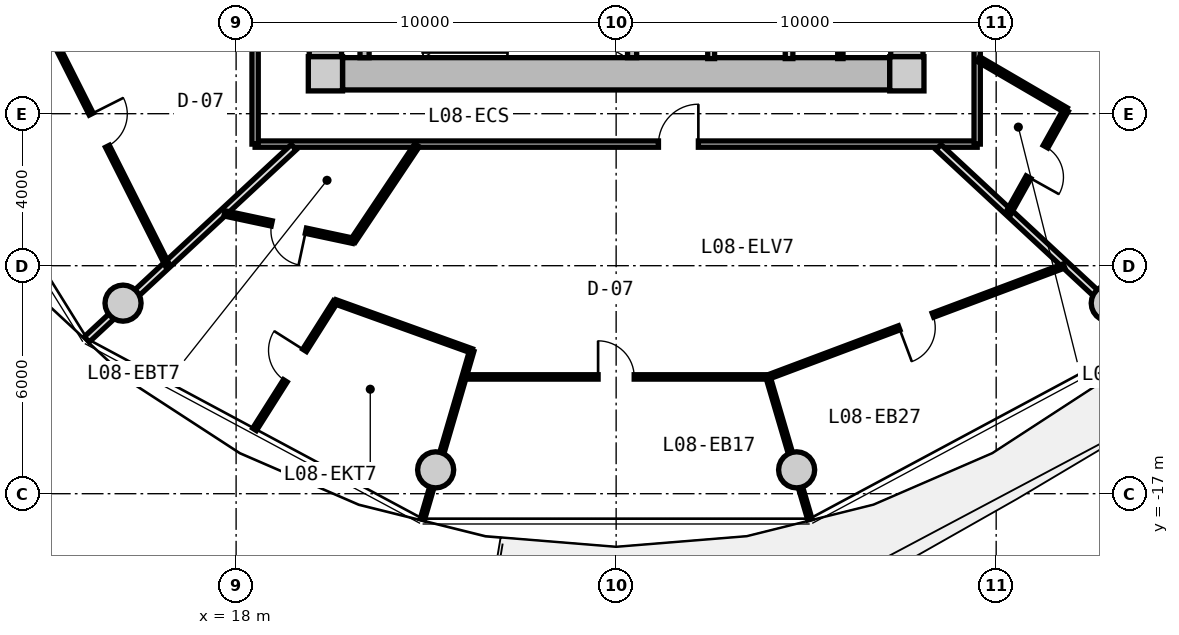
"""IFC4 building model, lengths in metres.
Left out: names, types, materials, properties, quantities, classifications, styles, units other than length and angle.
Written with IfcOpenShell. Run it as: python <this file> out.ifc"""

import sys

from ifc_helpers import new_model, si_unit, direction, frame, frame_2d, origin, origin_2d, place, context, subcontext, project, spatial, rectangle, circle, extrude, source, transform, mapped, element, fill, save


model = new_model("IFC4")
c1 = context("Model", 3, precision=1e-05, world=origin(), true_north=direction((0.0, 1.0)))
c2 = subcontext(c1, "Body", "Model", "MODEL_VIEW")
j1 = project(units=[si_unit("LENGTHUNIT", "METRE"), si_unit("PLANEANGLEUNIT", "RADIAN")], contexts=[c1])
p1 = place(None, origin())
s1 = spatial("IfcSite", under=j1, at=p1, CompositionType="ELEMENT")
p2 = place(p1, origin())
s2 = spatial("IfcBuilding", under=s1, at=p2, CompositionType="ELEMENT")
p3 = place(p2, frame((0.0, 0.0, 30.75)))
s3 = spatial("IfcBuildingStorey", under=s2, at=p3, CompositionType="ELEMENT", Elevation=30.75)
m1 = source(origin(), c2, "Body", "SweptSolid", [
    extrude(rectangle(XDim=0.9, YDim=0.9, at=origin_2d()), origin(), (0.0, 0.0, 1.0), 3.05),
])
for number, where, z_axis, x_axis in (
    (1, (20.35, -5.95, 0.0), (0.0, 0.0, 1.0), (1.0, 0.0, 0.0)),
    (2, (35.65, -5.95, 0.0), (0.0, 0.0, 1.0), (1.0, 0.0, 0.0)),
):
    element("IfcColumn", number, at=place(p3, frame(where, z_axis=z_axis, x_axis=x_axis)), inside=s3, PredefinedType="COLUMN", context=c2, shape_type="MappedRepresentation", body=[
        mapped(m1, transform((0.0, 0.0, 0.0), x_axis=(1.0, 0.0, 0.0), y_axis=(0.0, 1.0, 0.0), z_axis=(0.0, 0.0, 1.0), scale=1.0)),
    ])
m2 = source(origin(), c2, "Body", "SweptSolid", [
    extrude(rectangle(XDim=14.4, YDim=0.85, at=frame_2d((7.2, 0.0))), origin(), (0.0, 0.0, 1.0), 2.79),
])
p4 = place(p3, frame((35.2, -5.95, 0.0), z_axis=(0.0, 0.0, 1.0), x_axis=(-1.0, 0.0, 0.0)))
e3 = element("IfcWall", 3, at=p4, inside=s3, PredefinedType="SHEAR", context=c2, shape_type="MappedRepresentation", body=[
    mapped(m2, transform((0.0, 0.0, 0.0), x_axis=(1.0, 0.0, 0.0), y_axis=(0.0, 1.0, 0.0), z_axis=(0.0, 0.0, 1.0), scale=1.0)),
])
m3 = source(origin(), c2, "Body", "SweptSolid", [
    extrude(rectangle(XDim=11.0, YDim=0.85, at=frame_2d((5.5, 0.0))), origin(), (0.0, 0.0, 1.0), 2.79),
])
p5 = place(p3, frame((20.35, -5.5, 0.0), z_axis=(0.0, 0.0, 1.0), x_axis=(0.0, 1.0, 0.0)))
e4 = element("IfcWall", 4, at=p5, inside=s3, PredefinedType="SHEAR", context=c2, shape_type="MappedRepresentation", body=[
    mapped(m3, transform((0.0, 0.0, 0.0), x_axis=(1.0, 0.0, 0.0), y_axis=(0.0, 1.0, 0.0), z_axis=(0.0, 0.0, 1.0), scale=1.0)),
])
p6 = place(p5, frame((3.8, 0.0, 0.0)))
e5 = element("IfcOpeningElement", 5, at=p6, cuts=e4, PredefinedType="OPENING", context=c2, shape_type="SweptSolid", body=[
    extrude(rectangle(XDim=1.2, YDim=2.15, at=frame_2d((0.6, 1.075))), frame((0.0, 0.435, 0.0), z_axis=(0.0, -1.0, 0.0), x_axis=(1.0, 0.0, 0.0)), (0.0, 0.0, 1.0), 0.87),
])
p7 = place(p3, frame((35.65, 5.5, 0.0), z_axis=(0.0, 0.0, 1.0), x_axis=(0.0, -1.0, 0.0)))
e6 = element("IfcWall", 6, at=p7, inside=s3, PredefinedType="SHEAR", context=c2, shape_type="MappedRepresentation", body=[
    mapped(m3, transform((0.0, 0.0, 0.0), x_axis=(1.0, 0.0, 0.0), y_axis=(0.0, 1.0, 0.0), z_axis=(0.0, 0.0, 1.0), scale=1.0)),
])
p8 = place(p7, frame((5.65, 0.0, 0.0)))
e7 = element("IfcOpeningElement", 7, at=p8, cuts=e6, PredefinedType="OPENING", context=c2, shape_type="SweptSolid", body=[
    extrude(rectangle(XDim=1.2, YDim=2.15, at=frame_2d((0.6, 1.075))), frame((0.0, 0.435, 0.0), z_axis=(0.0, -1.0, 0.0), x_axis=(1.0, 0.0, 0.0)), (0.0, 0.0, 1.0), 0.87),
])
m4 = source(origin(), c2, "Body", "SweptSolid", [
    extrude(circle(Radius=0.475, at=origin_2d()), origin(), (0.0, 0.0, 1.0), 3.05),
])
for number, where, z_axis, x_axis in (
    (8, (15.025, -11.985, 0.0), (0.0, 0.0, 1.0), (1.0, 0.0, 0.0)),
    (9, (23.251, -16.373, 0.0), (0.0, 0.0, 1.0), (1.0, 0.0, 0.0)),
    (10, (32.749, -16.373, 0.0), (0.0, 0.0, 1.0), (1.0, 0.0, 0.0)),
    (11, (40.975, -11.985, 0.0), (0.0, 0.0, 1.0), (1.0, 0.0, 0.0)),
):
    element("IfcColumn", number, at=place(p3, frame(where, z_axis=z_axis, x_axis=x_axis)), inside=s3, PredefinedType="COLUMN", context=c2, shape_type="MappedRepresentation", body=[
        mapped(m4, transform((0.0, 0.0, 0.0), x_axis=(1.0, 0.0, 0.0), y_axis=(0.0, 1.0, 0.0), z_axis=(0.0, 0.0, 1.0), scale=1.0)),
    ])
m5 = source(origin(), c2, "Body", "SweptSolid", [
    extrude(rectangle(XDim=3.075, YDim=0.24, at=frame_2d((1.538, 0.0))), origin(), (0.0, 0.0, 1.0), 2.79),
])
for number, where, z_axis, x_axis in (
    (12, (21.38, -5.525, 0.0), (0.0, 0.0, 1.0), (0.0, 1.0, 0.0)),
    (13, (28.42, -5.525, 0.0), (0.0, 0.0, 1.0), (0.0, 1.0, 0.0)),
):
    element("IfcWall", number, at=place(p3, frame(where, z_axis=z_axis, x_axis=x_axis)), inside=s3, PredefinedType="PARTITIONING", context=c2, shape_type="MappedRepresentation", body=[
        mapped(m5, transform((0.0, 0.0, 0.0), x_axis=(1.0, 0.0, 0.0), y_axis=(0.0, 1.0, 0.0), z_axis=(0.0, 0.0, 1.0), scale=1.0)),
    ])
m6 = source(origin(), c2, "Body", "SweptSolid", [
    extrude(rectangle(XDim=3.8, YDim=0.2, at=frame_2d((1.9, 0.0))), origin(), (0.0, 0.0, 1.0), 2.775),
])
p9 = place(p3, frame((32.55, -5.55, 0.0), z_axis=(0.0, 0.0, 1.0), x_axis=(0.0, 1.0, 0.0)))
e14 = element("IfcWall", 14, at=p9, inside=s3, PredefinedType="PARTITIONING", context=c2, shape_type="MappedRepresentation", body=[
    mapped(m6, transform((0.0, 0.0, 0.0), x_axis=(1.0, 0.0, 0.0), y_axis=(0.0, 1.0, 0.0), z_axis=(0.0, 0.0, 1.0), scale=1.0)),
])
m7 = source(origin(), c2, "Body", "SweptSolid", [
    extrude(rectangle(XDim=3.22, YDim=0.18, at=frame_2d((1.61, 0.0))), origin(), (0.0, 0.0, 1.0), 2.775),
])
p10 = place(p3, frame((30.5, -5.55, 0.0), z_axis=(0.0, 0.0, 1.0), x_axis=(0.0, 1.0, 0.0)))
e15 = element("IfcWall", 15, at=p10, inside=s3, PredefinedType="PARTITIONING", context=c2, shape_type="MappedRepresentation", body=[
    mapped(m7, transform((0.0, 0.0, 0.0), x_axis=(1.0, 0.0, 0.0), y_axis=(0.0, 1.0, 0.0), z_axis=(0.0, 0.0, 1.0), scale=1.0)),
])
m8 = source(origin(), c2, "Body", "SweptSolid", [
    extrude(rectangle(XDim=3.8, YDim=0.14, at=frame_2d((1.9, 0.0))), origin(), (0.0, 0.0, 1.0), 2.775),
])
p11 = place(p3, frame((33.9, -5.55, 0.0), z_axis=(0.0, 0.0, 1.0), x_axis=(0.0, 1.0, 0.0)))
e16 = element("IfcWall", 16, at=p11, inside=s3, PredefinedType="PARTITIONING", context=c2, shape_type="MappedRepresentation", body=[
    mapped(m8, transform((0.0, 0.0, 0.0), x_axis=(1.0, 0.0, 0.0), y_axis=(0.0, 1.0, 0.0), z_axis=(0.0, 0.0, 1.0), scale=1.0)),
])
m9 = source(origin(), c2, "Body", "SweptSolid", [
    extrude(rectangle(XDim=19.0, YDim=0.165, at=frame_2d((9.5, 0.0))), origin(), (0.0, 0.0, 1.0), 2.775),
])
p12 = place(p3, frame((37.5, -7.8, 0.0), z_axis=(0.0, 0.0, 1.0), x_axis=(-1.0, 0.0, 0.0)))
e17 = element("IfcWall", 17, at=p12, inside=s3, PredefinedType="PARTITIONING", context=c2, shape_type="MappedRepresentation", body=[
    mapped(m9, transform((0.0, 0.0, 0.0), x_axis=(1.0, 0.0, 0.0), y_axis=(0.0, 1.0, 0.0), z_axis=(0.0, 0.0, 1.0), scale=1.0)),
])
p13 = place(p12, frame((7.336, 0.0, 0.0)))
e18 = element("IfcOpeningElement", 18, at=p13, cuts=e17, PredefinedType="OPENING", context=c2, shape_type="SweptSolid", body=[
    extrude(rectangle(XDim=1.05, YDim=2.15, at=frame_2d((0.525, 1.075))), frame((0.0, 0.093, 0.0), z_axis=(0.0, -1.0, 0.0), x_axis=(1.0, 0.0, 0.0)), (0.0, 0.0, 1.0), 0.185),
])
m10 = source(origin(), c2, "Body", "SweptSolid", [
    extrude(rectangle(XDim=15.6, YDim=0.165, at=frame_2d((7.8, 0.0))), origin(), (0.0, 0.0, 1.0), 2.775),
])
p14 = place(p3, frame((18.5, -7.8, 0.0), z_axis=(0.0, 0.0, 1.0), x_axis=(0.0, 1.0, 0.0)))
e19 = element("IfcWall", 19, at=p14, inside=s3, PredefinedType="PARTITIONING", context=c2, shape_type="MappedRepresentation", body=[
    mapped(m10, transform((0.0, 0.0, 0.0), x_axis=(1.0, 0.0, 0.0), y_axis=(0.0, 1.0, 0.0), z_axis=(0.0, 0.0, 1.0), scale=1.0)),
])
p15 = place(p14, frame((12.141, 0.0, 0.0)))
e20 = element("IfcOpeningElement", 20, at=p15, cuts=e19, PredefinedType="OPENING", context=c2, shape_type="SweptSolid", body=[
    extrude(rectangle(XDim=1.25, YDim=2.2, at=frame_2d((0.625, 1.1))), frame((0.0, 0.093, 0.0), z_axis=(0.0, -1.0, 0.0), x_axis=(1.0, 0.0, 0.0)), (0.0, 0.0, 1.0), 0.185),
])
p16 = place(p14, frame((3.63, 0.0, 0.0)))
e21 = element("IfcOpeningElement", 21, at=p16, cuts=e19, PredefinedType="OPENING", context=c2, shape_type="SweptSolid", body=[
    extrude(rectangle(XDim=1.05, YDim=2.15, at=frame_2d((0.525, 1.075))), frame((0.0, 0.093, 0.0), z_axis=(0.0, -1.0, 0.0), x_axis=(1.0, 0.0, 0.0)), (0.0, 0.0, 1.0), 0.185),
])
p17 = place(p3, frame((37.5, 7.8, 0.0), z_axis=(0.0, 0.0, 1.0), x_axis=(0.0, -1.0, 0.0)))
e22 = element("IfcWall", 22, at=p17, inside=s3, PredefinedType="PARTITIONING", context=c2, shape_type="MappedRepresentation", body=[
    mapped(m10, transform((0.0, 0.0, 0.0), x_axis=(1.0, 0.0, 0.0), y_axis=(0.0, 1.0, 0.0), z_axis=(0.0, 0.0, 1.0), scale=1.0)),
])
p18 = place(p17, frame((6.269, 0.0, 0.0)))
e23 = element("IfcOpeningElement", 23, at=p18, cuts=e22, PredefinedType="OPENING", context=c2, shape_type="SweptSolid", body=[
    extrude(rectangle(XDim=1.05, YDim=2.15, at=frame_2d((0.525, 1.075))), frame((0.0, 0.093, 0.0), z_axis=(0.0, -1.0, 0.0), x_axis=(1.0, 0.0, 0.0)), (0.0, 0.0, 1.0), 0.185),
])
m11 = source(origin(), c2, "Body", "SweptSolid", [
    extrude(rectangle(XDim=7.435, YDim=0.19, at=frame_2d((3.717, 0.0))), origin(), (0.0, 0.0, 1.0), 2.225),
])
p19 = place(p3, frame((19.517, -7.88, 0.0), z_axis=(0.0, 0.0, 1.0), x_axis=(-0.732651956848, -0.680603489652, 0.0)))
e24 = element("IfcWall", 24, at=p19, inside=s3, PredefinedType="PARTITIONING", context=c2, shape_type="MappedRepresentation", body=[
    mapped(m11, transform((0.0, 0.0, 0.0), x_axis=(1.0, 0.0, 0.0), y_axis=(0.0, 1.0, 0.0), z_axis=(0.0, 0.0, 1.0), scale=1.0)),
])
m12 = source(origin(), c2, "Body", "SweptSolid", [
    extrude(rectangle(XDim=8.018, YDim=0.115, at=frame_2d((4.009, 0.0))), origin(), (0.0, 0.0, 1.0), 2.775),
])
p20 = place(p3, frame((12.596, -3.854, 0.0), z_axis=(0.0, 0.0, 1.0), x_axis=(0.450134355233, -0.89296084026, 0.0)))
e25 = element("IfcWall", 25, at=p20, inside=s3, PredefinedType="PARTITIONING", context=c2, shape_type="MappedRepresentation", body=[
    mapped(m12, transform((0.0, 0.0, 0.0), x_axis=(1.0, 0.0, 0.0), y_axis=(0.0, 1.0, 0.0), z_axis=(0.0, 0.0, 1.0), scale=1.0)),
])
p21 = place(p20, frame((3.534, 0.0, 0.0)))
e26 = element("IfcOpeningElement", 26, at=p21, cuts=e25, PredefinedType="OPENING", context=c2, shape_type="SweptSolid", body=[
    extrude(rectangle(XDim=0.95, YDim=2.1, at=frame_2d((0.475, 1.05))), frame((0.0, 0.067, 0.0), z_axis=(0.0, -1.0, 0.0), x_axis=(1.0, 0.0, 0.0)), (0.0, 0.0, 1.0), 0.135),
])
m13 = source(origin(), c2, "Body", "SweptSolid", [
    extrude(rectangle(XDim=7.435, YDim=0.19, at=frame_2d((3.717, 0.0))), origin(), (0.0, 0.0, 1.0), 2.415),
])
p22 = place(p3, frame((36.483, -7.88, 0.0), z_axis=(0.0, 0.0, 1.0), x_axis=(0.732651956848, -0.680603489652, 0.0)))
e27 = element("IfcWall", 27, at=p22, inside=s3, PredefinedType="PARTITIONING", context=c2, shape_type="MappedRepresentation", body=[
    mapped(m13, transform((0.0, 0.0, 0.0), x_axis=(1.0, 0.0, 0.0), y_axis=(0.0, 1.0, 0.0), z_axis=(0.0, 0.0, 1.0), scale=1.0)),
])
m14 = source(origin(), c2, "Body", "SweptSolid", [
    extrude(rectangle(XDim=7.993, YDim=0.115, at=frame_2d((3.996, 0.0))), origin(), (0.0, 0.0, 1.0), 2.775),
])
p23 = place(p3, frame((24.004, -13.927, 0.0), z_axis=(0.0, 0.0, 1.0), x_axis=(1.0, 0.0, 0.0)))
e28 = element("IfcWall", 28, at=p23, inside=s3, PredefinedType="PARTITIONING", context=c2, shape_type="MappedRepresentation", body=[
    mapped(m14, transform((0.0, 0.0, 0.0), x_axis=(1.0, 0.0, 0.0), y_axis=(0.0, 1.0, 0.0), z_axis=(0.0, 0.0, 1.0), scale=1.0)),
])
p24 = place(p23, frame((3.521, 0.0, 0.0)))
e29 = element("IfcOpeningElement", 29, at=p24, cuts=e28, PredefinedType="OPENING", context=c2, shape_type="SweptSolid", body=[
    extrude(rectangle(XDim=0.95, YDim=2.1, at=frame_2d((0.475, 1.05))), frame((0.0, 0.067, 0.0), z_axis=(0.0, -1.0, 0.0), x_axis=(1.0, 0.0, 0.0)), (0.0, 0.0, 1.0), 0.135),
])
m15 = source(origin(), c2, "Body", "SweptSolid", [
    extrude(rectangle(XDim=4.625, YDim=0.115, at=frame_2d((2.312, 0.0))), origin(), (0.0, 0.0, 1.0), 2.225),
])
p25 = place(p3, frame((24.201, -13.239, 0.0), z_axis=(0.0, 0.0, 1.0), x_axis=(-0.2810742844, -0.959686014616, 0.0)))
e30 = element("IfcWall", 30, at=p25, inside=s3, PredefinedType="PARTITIONING", context=c2, shape_type="MappedRepresentation", body=[
    mapped(m15, transform((0.0, 0.0, 0.0), x_axis=(1.0, 0.0, 0.0), y_axis=(0.0, 1.0, 0.0), z_axis=(0.0, 0.0, 1.0), scale=1.0)),
])
m16 = source(origin(), c2, "Body", "SweptSolid", [
    extrude(rectangle(XDim=8.32, YDim=0.115, at=frame_2d((4.16, 0.0))), origin(), (0.0, 0.0, 1.0), 2.775),
])
p26 = place(p3, frame((31.997, -13.93, 0.0), z_axis=(0.0, 0.0, 1.0), x_axis=(0.936180763098, 0.351518959382, 0.0)))
e31 = element("IfcWall", 31, at=p26, inside=s3, PredefinedType="PARTITIONING", context=c2, shape_type="MappedRepresentation", body=[
    mapped(m16, transform((0.0, 0.0, 0.0), x_axis=(1.0, 0.0, 0.0), y_axis=(0.0, 1.0, 0.0), z_axis=(0.0, 0.0, 1.0), scale=1.0)),
])
p27 = place(p26, frame((3.685, 0.0, 0.0)))
e32 = element("IfcOpeningElement", 32, at=p27, cuts=e31, PredefinedType="OPENING", context=c2, shape_type="SweptSolid", body=[
    extrude(rectangle(XDim=0.95, YDim=2.1, at=frame_2d((0.475, 1.05))), frame((0.0, 0.067, 0.0), z_axis=(0.0, -1.0, 0.0), x_axis=(1.0, 0.0, 0.0)), (0.0, 0.0, 1.0), 0.135),
])
m17 = source(origin(), c2, "Body", "SweptSolid", [
    extrude(rectangle(XDim=3.905, YDim=0.115, at=frame_2d((1.952, 0.0))), origin(), (0.0, 0.0, 1.0), 2.225),
])
p28 = place(p3, frame((31.997, -13.93, 0.0), z_axis=(0.0, 0.0, 1.0), x_axis=(0.282037692958, -0.959403324859, 0.0)))
e33 = element("IfcWall", 33, at=p28, inside=s3, PredefinedType="PARTITIONING", context=c2, shape_type="MappedRepresentation", body=[
    mapped(m17, transform((0.0, 0.0, 0.0), x_axis=(1.0, 0.0, 0.0), y_axis=(0.0, 1.0, 0.0), z_axis=(0.0, 0.0, 1.0), scale=1.0)),
])
m18 = source(origin(), c2, "Body", "SweptSolid", [
    extrude(rectangle(XDim=3.025, YDim=0.14, at=frame_2d((1.513, 0.0))), origin(), (0.0, 0.0, 1.0), 2.775),
])
p29 = place(p3, frame((22.76, -7.83, 0.0), z_axis=(0.0, 0.0, 1.0), x_axis=(-0.556189165904, -0.831055721195, 0.0)))
e34 = element("IfcWall", 34, at=p29, inside=s3, PredefinedType="PARTITIONING", context=c2, shape_type="MappedRepresentation", body=[
    mapped(m18, transform((0.0, 0.0, 0.0), x_axis=(1.0, 0.0, 0.0), y_axis=(0.0, 1.0, 0.0), z_axis=(0.0, 0.0, 1.0), scale=1.0)),
])
m19 = source(origin(), c2, "Body", "SweptSolid", [
    extrude(rectangle(XDim=3.459, YDim=0.14, at=frame_2d((1.729, 0.0))), origin(), (0.0, 0.0, 1.0), 2.775),
])
p30 = place(p3, frame((21.078, -10.344, 0.0), z_axis=(0.0, 0.0, 1.0), x_axis=(-0.978006468578, 0.208574560815, 0.0)))
e35 = element("IfcWall", 35, at=p30, inside=s3, PredefinedType="PARTITIONING", context=c2, shape_type="MappedRepresentation", body=[
    mapped(m19, transform((0.0, 0.0, 0.0), x_axis=(1.0, 0.0, 0.0), y_axis=(0.0, 1.0, 0.0), z_axis=(0.0, 0.0, 1.0), scale=1.0)),
])
p31 = place(p30, frame((1.27, 0.0, 0.0)))
e36 = element("IfcOpeningElement", 36, at=p31, cuts=e35, PredefinedType="OPENING", context=c2, shape_type="SweptSolid", body=[
    extrude(rectangle(XDim=0.92, YDim=2.1, at=frame_2d((0.46, 1.05))), frame((0.0, 0.08, 0.0), z_axis=(0.0, -1.0, 0.0), x_axis=(1.0, 0.0, 0.0)), (0.0, 0.0, 1.0), 0.16),
])
m20 = source(origin(), c2, "Body", "SweptSolid", [
    extrude(rectangle(XDim=3.974, YDim=0.115, at=frame_2d((1.987, 0.0))), origin(), (0.0, 0.0, 1.0), 2.775),
])
p32 = place(p3, frame((20.611, -11.95, 0.0), z_axis=(0.0, 0.0, 1.0), x_axis=(-0.534810918023, -0.844971764003, 0.0)))
e37 = element("IfcWall", 37, at=p32, inside=s3, PredefinedType="PARTITIONING", context=c2, shape_type="MappedRepresentation", body=[
    mapped(m20, transform((0.0, 0.0, 0.0), x_axis=(1.0, 0.0, 0.0), y_axis=(0.0, 1.0, 0.0), z_axis=(0.0, 0.0, 1.0), scale=1.0)),
])
p33 = place(p32, frame((1.512, 0.0, 0.0)))
e38 = element("IfcOpeningElement", 38, at=p33, cuts=e37, PredefinedType="OPENING", context=c2, shape_type="SweptSolid", body=[
    extrude(rectangle(XDim=0.95, YDim=2.1, at=frame_2d((0.475, 1.05))), frame((0.0, 0.067, 0.0), z_axis=(0.0, -1.0, 0.0), x_axis=(1.0, 0.0, 0.0)), (0.0, 0.0, 1.0), 0.135),
])
m21 = source(origin(), c2, "Body", "SweptSolid", [
    extrude(rectangle(XDim=3.814, YDim=0.115, at=frame_2d((1.907, 0.0))), origin(), (0.0, 0.0, 1.0), 2.775),
])
p34 = place(p3, frame((20.611, -11.95, 0.0), z_axis=(0.0, 0.0, 1.0), x_axis=(0.940935542004, -0.338585743637, 0.0)))
e39 = element("IfcWall", 39, at=p34, inside=s3, PredefinedType="PARTITIONING", context=c2, shape_type="MappedRepresentation", body=[
    mapped(m21, transform((0.0, 0.0, 0.0), x_axis=(1.0, 0.0, 0.0), y_axis=(0.0, 1.0, 0.0), z_axis=(0.0, 0.0, 1.0), scale=1.0)),
])
m22 = source(origin(), c2, "Body", "SweptSolid", [
    extrude(rectangle(XDim=2.669, YDim=0.14, at=frame_2d((1.335, 0.0))), origin(), (0.0, 0.0, 1.0), 2.775),
])
p35 = place(p3, frame((37.53, -5.561, 0.0), z_axis=(0.0, 0.0, 1.0), x_axis=(0.86369928178, -0.50400749067, 0.0)))
e40 = element("IfcWall", 40, at=p35, inside=s3, PredefinedType="PARTITIONING", context=c2, shape_type="MappedRepresentation", body=[
    mapped(m22, transform((0.0, 0.0, 0.0), x_axis=(1.0, 0.0, 0.0), y_axis=(0.0, 1.0, 0.0), z_axis=(0.0, 0.0, 1.0), scale=1.0)),
])
m23 = source(origin(), c2, "Body", "SweptSolid", [
    extrude(rectangle(XDim=3.121, YDim=0.14, at=frame_2d((1.561, 0.0))), origin(), (0.0, 0.0, 1.0), 2.775),
])
p36 = place(p3, frame((39.836, -6.906, 0.0), z_axis=(0.0, 0.0, 1.0), x_axis=(-0.487302357327, -0.873233309342, 0.0)))
e41 = element("IfcWall", 41, at=p36, inside=s3, PredefinedType="PARTITIONING", context=c2, shape_type="MappedRepresentation", body=[
    mapped(m23, transform((0.0, 0.0, 0.0), x_axis=(1.0, 0.0, 0.0), y_axis=(0.0, 1.0, 0.0), z_axis=(0.0, 0.0, 1.0), scale=1.0)),
])
p37 = place(p36, frame((1.101, 0.0, 0.0)))
e42 = element("IfcOpeningElement", 42, at=p37, cuts=e41, PredefinedType="OPENING", context=c2, shape_type="SweptSolid", body=[
    extrude(rectangle(XDim=0.92, YDim=2.1, at=frame_2d((0.46, 1.05))), frame((0.0, 0.08, 0.0), z_axis=(0.0, -1.0, 0.0), x_axis=(1.0, 0.0, 0.0)), (0.0, 0.0, 1.0), 0.16),
])
m24 = source(origin(), c2, "Body", "SweptSolid", [
    extrude(rectangle(XDim=0.95, YDim=2.1, at=frame_2d((0.475, 1.05))), frame((0.0, 0.025, 0.0), z_axis=(0.0, -1.0, 0.0), x_axis=(1.0, 0.0, 0.0)), (0.0, 0.0, 1.0), 0.05),
])
p38 = place(p21, origin())
e43 = element("IfcDoor", 43, at=p38, inside=s3, OperationType="SINGLE_SWING_LEFT", PredefinedType="DOOR", context=c2, shape_type="MappedRepresentation", body=[
    mapped(m24, transform((0.0, 0.0, 0.0), x_axis=(1.0, 0.0, 0.0), y_axis=(0.0, 1.0, 0.0), z_axis=(0.0, 0.0, 1.0), scale=1.0)),
])
fill(e26, e43)
m25 = source(origin(), c2, "Body", "SweptSolid", [
    extrude(rectangle(XDim=1.05, YDim=2.15, at=frame_2d((0.525, 1.075))), frame((0.0, 0.025, 0.0), z_axis=(0.0, -1.0, 0.0), x_axis=(1.0, 0.0, 0.0)), (0.0, 0.0, 1.0), 0.05),
])
p39 = place(p13, frame((1.05, 0.0, 0.0), z_axis=(0.0, 0.0, 1.0), x_axis=(-1.0, 0.0, 0.0)))
e44 = element("IfcDoor", 44, at=p39, inside=s3, OperationType="SINGLE_SWING_RIGHT", PredefinedType="DOOR", context=c2, shape_type="MappedRepresentation", body=[
    mapped(m25, transform((0.0, 0.0, 0.0), x_axis=(1.0, 0.0, 0.0), y_axis=(0.0, 1.0, 0.0), z_axis=(0.0, 0.0, 1.0), scale=1.0)),
])
fill(e18, e44)
m26 = source(origin(), c2, "Body", "SweptSolid", [
    extrude(rectangle(XDim=0.92, YDim=2.1, at=frame_2d((0.46, 1.05))), frame((0.0, 0.025, 0.0), z_axis=(0.0, -1.0, 0.0), x_axis=(1.0, 0.0, 0.0)), (0.0, 0.0, 1.0), 0.05),
])
p40 = place(p31, origin())
e45 = element("IfcDoor", 45, at=p40, inside=s3, OperationType="SINGLE_SWING_LEFT", PredefinedType="DOOR", context=c2, shape_type="MappedRepresentation", body=[
    mapped(m26, transform((0.0, 0.0, 0.0), x_axis=(1.0, 0.0, 0.0), y_axis=(0.0, 1.0, 0.0), z_axis=(0.0, 0.0, 1.0), scale=1.0)),
])
fill(e36, e45)
p41 = place(p33, frame((0.95, 0.0, 0.0), z_axis=(0.0, 0.0, 1.0), x_axis=(-1.0, 0.0, 0.0)))
e46 = element("IfcDoor", 46, at=p41, inside=s3, OperationType="SINGLE_SWING_RIGHT", PredefinedType="DOOR", context=c2, shape_type="MappedRepresentation", body=[
    mapped(m24, transform((0.0, 0.0, 0.0), x_axis=(1.0, 0.0, 0.0), y_axis=(0.0, 1.0, 0.0), z_axis=(0.0, 0.0, 1.0), scale=1.0)),
])
fill(e38, e46)
p42 = place(p24, origin())
e47 = element("IfcDoor", 47, at=p42, inside=s3, OperationType="SINGLE_SWING_LEFT", PredefinedType="DOOR", context=c2, shape_type="MappedRepresentation", body=[
    mapped(m24, transform((0.0, 0.0, 0.0), x_axis=(1.0, 0.0, 0.0), y_axis=(0.0, 1.0, 0.0), z_axis=(0.0, 0.0, 1.0), scale=1.0)),
])
fill(e29, e47)
p43 = place(p27, frame((0.95, 0.0, 0.0), z_axis=(0.0, 0.0, 1.0), x_axis=(-1.0, 0.0, 0.0)))
e48 = element("IfcDoor", 48, at=p43, inside=s3, OperationType="SINGLE_SWING_RIGHT", PredefinedType="DOOR", context=c2, shape_type="MappedRepresentation", body=[
    mapped(m24, transform((0.0, 0.0, 0.0), x_axis=(1.0, 0.0, 0.0), y_axis=(0.0, 1.0, 0.0), z_axis=(0.0, 0.0, 1.0), scale=1.0)),
])
fill(e32, e48)
p44 = place(p37, origin())
e49 = element("IfcDoor", 49, at=p44, inside=s3, OperationType="SINGLE_SWING_RIGHT", PredefinedType="DOOR", context=c2, shape_type="MappedRepresentation", body=[
    mapped(m26, transform((0.0, 0.0, 0.0), x_axis=(1.0, 0.0, 0.0), y_axis=(0.0, 1.0, 0.0), z_axis=(0.0, 0.0, 1.0), scale=1.0)),
])
fill(e42, e49)
save(model, sys.argv[1])
